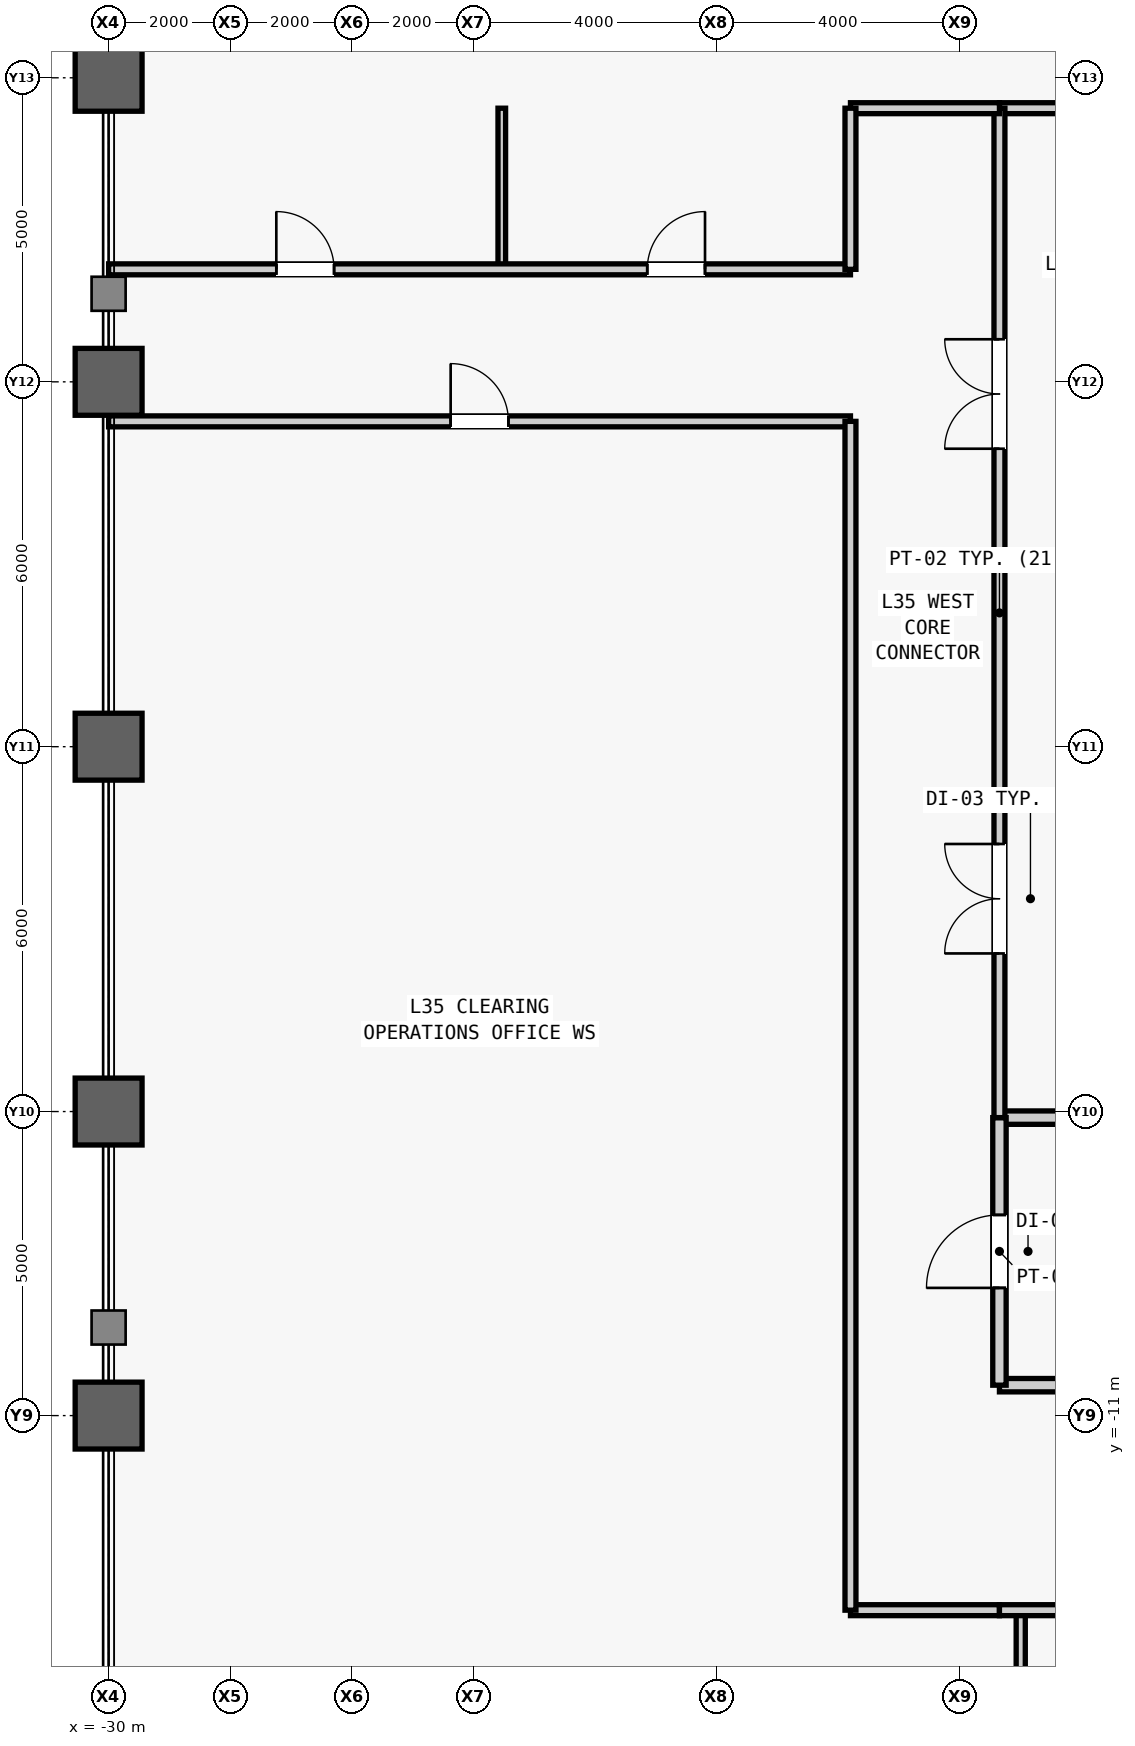
"""IFC4 building model, lengths in metres.
Left out: names, types, materials, properties, quantities, classifications, styles, units other than length and angle.
Written with IfcOpenShell. Run it as: python <this file> out.ifc"""

import sys

from ifc_helpers import new_model, si_unit, direction, frame, frame_2d, origin, origin_2d, place, context, subcontext, project, spatial, rectangle, hollow_rectangle, extrude, source, transform, mapped, element, fill, save


model = new_model("IFC4")
c1 = context("Model", 3, precision=1e-05, world=origin(), true_north=direction((0.0, 1.0)))
c2 = subcontext(c1, "Body", "Model", "MODEL_VIEW")
j1 = project(units=[si_unit("LENGTHUNIT", "METRE"), si_unit("PLANEANGLEUNIT", "RADIAN")], contexts=[c1])
p1 = place(None, origin())
s1 = spatial("IfcSite", under=j1, at=p1, CompositionType="ELEMENT")
p2 = place(p1, origin())
s2 = spatial("IfcBuilding", under=s1, at=p2, CompositionType="ELEMENT")
p3 = place(p2, frame((0.0, 0.0, 155.1)))
s3 = spatial("IfcBuildingStorey", under=s2, at=p3, CompositionType="ELEMENT", Elevation=155.1)
m1 = source(origin(), c2, "Body", "SweptSolid", [
    extrude(hollow_rectangle(XDim=1.1, YDim=1.1, WallThickness=0.06, at=origin_2d()), origin(), (0.0, 0.0, 1.0), 4.0),
])
for number, where, z_axis, x_axis in (
    (1, (-30.0, -11.0, 0.0), (0.0, 0.0, 1.0), (1.0, 0.0, 0.0)),
    (2, (-30.0, -6.0, 0.0), (0.0, 0.0, 1.0), (1.0, 0.0, 0.0)),
    (3, (-30.0, 0.0, 0.0), (0.0, 0.0, 1.0), (1.0, 0.0, 0.0)),
    (4, (-30.0, 6.0, 0.0), (0.0, 0.0, 1.0), (1.0, 0.0, 0.0)),
    (5, (-30.0, 11.0, 0.0), (0.0, 0.0, 1.0), (1.0, 0.0, 0.0)),
):
    element("IfcColumn", number, at=place(p3, frame(where, z_axis=z_axis, x_axis=x_axis)), inside=s3, PredefinedType="COLUMN", context=c2, shape_type="MappedRepresentation", body=[
        mapped(m1, transform((0.0, 0.0, 0.0), scale=1.0)),
    ])
m2 = source(origin(), c2, "Body", "SweptSolid", [
    extrude(rectangle(XDim=4.05, YDim=0.22, at=frame_2d((2.025, 0.0))), origin(), (0.0, 0.0, 1.0), 3.78),
])
p4 = place(p3, frame((-15.35, -10.5, 0.0), z_axis=(0.0, 0.0, 1.0), x_axis=(1.0, 0.0, 0.0)))
e6 = element("IfcWall", 6, at=p4, inside=s3, PredefinedType="PARTITIONING", context=c2, shape_type="MappedRepresentation", body=[
    mapped(m2, transform((0.0, 0.0, 0.0), scale=1.0)),
])
m3 = source(origin(), c2, "Body", "SweptSolid", [
    extrude(rectangle(XDim=4.05, YDim=0.22, at=frame_2d((2.025, 0.0))), origin(), (0.0, 0.0, 1.0), 3.007),
])
p5 = place(p3, frame((-15.35, -6.1, 0.0), z_axis=(0.0, 0.0, 1.0), x_axis=(1.0, 0.0, 0.0)))
e7 = element("IfcWall", 7, at=p5, inside=s3, PredefinedType="PARTITIONING", context=c2, shape_type="MappedRepresentation", body=[
    mapped(m3, transform((0.0, 0.0, 0.0), scale=1.0)),
])
m4 = source(origin(), c2, "Body", "SweptSolid", [
    extrude(rectangle(XDim=4.4, YDim=0.22, at=frame_2d((2.2, 0.0))), origin(), (0.0, 0.0, 1.0), 3.78),
])
p6 = place(p3, frame((-15.35, -10.5, 0.0), z_axis=(0.0, 0.0, 1.0), x_axis=(0.0, 1.0, 0.0)))
e8 = element("IfcWall", 8, at=p6, inside=s3, PredefinedType="PARTITIONING", context=c2, shape_type="MappedRepresentation", body=[
    mapped(m4, transform((0.0, 0.0, 0.0), scale=1.0)),
])
m5 = source(origin(), c2, "Body", "SweptSolid", [
    extrude(rectangle(XDim=1.2, YDim=2.2, at=frame_2d((0.6, 1.1))), frame((0.0, 0.12, 0.0), z_axis=(0.0, -1.0, 0.0), x_axis=(1.0, 0.0, 0.0)), (0.0, 0.0, 1.0), 0.24),
])
p7 = place(p6, frame((1.6, 0.0, 0.0)))
e9 = element("IfcOpeningElement", 9, at=p7, cuts=e8, PredefinedType="OPENING", context=c2, shape_type="MappedRepresentation", body=[
    mapped(m5, transform((0.0, 0.0, 0.0), scale=1.0)),
])
m6 = source(origin(), c2, "Body", "SweptSolid", [
    extrude(rectangle(XDim=4.05, YDim=0.18, at=frame_2d((2.025, 0.0))), origin(), (0.0, 0.0, 1.0), 3.78),
])
p8 = place(p3, frame((-15.35, 10.5, 0.0), z_axis=(0.0, 0.0, 1.0), x_axis=(1.0, 0.0, 0.0)))
e10 = element("IfcWall", 10, at=p8, inside=s3, PredefinedType="PARTITIONING", context=c2, shape_type="MappedRepresentation", body=[
    mapped(m6, transform((0.0, 0.0, 0.0), scale=1.0)),
])
m7 = source(origin(), c2, "Body", "SweptSolid", [
    extrude(rectangle(XDim=16.6, YDim=0.18, at=frame_2d((8.3, 0.0))), origin(), (0.0, 0.0, 1.0), 3.78),
])
p9 = place(p3, frame((-15.35, -6.1, 0.0), z_axis=(0.0, 0.0, 1.0), x_axis=(0.0, 1.0, 0.0)))
e11 = element("IfcWall", 11, at=p9, inside=s3, PredefinedType="PARTITIONING", context=c2, shape_type="MappedRepresentation", body=[
    mapped(m7, transform((0.0, 0.0, 0.0), scale=1.0)),
])
m8 = source(origin(), c2, "Body", "SweptSolid", [
    extrude(rectangle(XDim=1.8, YDim=2.25, at=frame_2d((0.9, 1.125))), frame((0.0, 0.1, 0.0), z_axis=(0.0, -1.0, 0.0), x_axis=(1.0, 0.0, 0.0)), (0.0, 0.0, 1.0), 0.2),
])
p10 = place(p9, frame((2.7, 0.0, 0.0)))
e12 = element("IfcOpeningElement", 12, at=p10, cuts=e11, PredefinedType="OPENING", context=c2, shape_type="MappedRepresentation", body=[
    mapped(m8, transform((0.0, 0.0, 0.0), scale=1.0)),
])
p11 = place(p9, frame((11.0, 0.0, 0.0)))
e13 = element("IfcOpeningElement", 13, at=p11, cuts=e11, PredefinedType="OPENING", context=c2, shape_type="MappedRepresentation", body=[
    mapped(m8, transform((0.0, 0.0, 0.0), scale=1.0)),
])
m9 = source(origin(), c2, "Body", "SweptSolid", [
    extrude(rectangle(XDim=2.45, YDim=0.18, at=frame_2d((1.225, 0.0))), origin(), (0.0, 0.0, 1.0), 3.78),
])
for number, where, z_axis, x_axis in (
    (14, (-17.8, 10.5, 0.0), (0.0, 0.0, 1.0), (1.0, 0.0, 0.0)),
    (15, (-17.8, -14.2, 0.0), (0.0, 0.0, 1.0), (1.0, 0.0, 0.0)),
):
    element("IfcWall", number, at=place(p3, frame(where, z_axis=z_axis, x_axis=x_axis)), inside=s3, PredefinedType="PARTITIONING", context=c2, shape_type="MappedRepresentation", body=[
        mapped(m9, transform((0.0, 0.0, 0.0), scale=1.0)),
    ])
m10 = source(origin(), c2, "Body", "SweptSolid", [
    extrude(rectangle(XDim=15.8, YDim=0.15, at=frame_2d((7.9, 0.0))), origin(), (0.0, 0.0, 1.0), 3.78),
])
p12 = place(p3, frame((-15.0, -30.0, 0.0), z_axis=(0.0, 0.0, 1.0), x_axis=(0.0, 1.0, 0.0)))
e16 = element("IfcWall", 16, at=p12, inside=s3, PredefinedType="PARTITIONING", context=c2, shape_type="MappedRepresentation", body=[
    mapped(m10, transform((0.0, 0.0, 0.0), scale=1.0)),
])
m11 = source(origin(), c2, "Body", "SweptSolid", [
    extrude(rectangle(XDim=0.95, YDim=2.15, at=frame_2d((0.475, 1.075))), frame((0.0, 0.085, 0.0), z_axis=(0.0, -1.0, 0.0), x_axis=(1.0, 0.0, 0.0)), (0.0, 0.0, 1.0), 0.17),
])
p13 = place(p12, frame((11.375, 0.0, 0.0)))
e17 = element("IfcOpeningElement", 17, at=p13, cuts=e16, PredefinedType="OPENING", context=c2, shape_type="MappedRepresentation", body=[
    mapped(m11, transform((0.0, 0.0, 0.0), scale=1.0)),
])
m12 = source(origin(), c2, "Body", "SweptSolid", [
    extrude(rectangle(XDim=27.35, YDim=0.18, at=frame_2d((13.675, 0.0))), origin(), (0.0, 0.0, 1.0), 3.78),
])
p14 = place(p3, frame((-15.35, -14.2, 0.0), z_axis=(0.0, 0.0, 1.0), x_axis=(1.0, 0.0, 0.0)))
e18 = element("IfcWall", 18, at=p14, inside=s3, PredefinedType="PARTITIONING", context=c2, shape_type="MappedRepresentation", body=[
    mapped(m12, transform((0.0, 0.0, 0.0), scale=1.0)),
])
m13 = source(origin(), c2, "Body", "SweptSolid", [
    extrude(rectangle(XDim=12.2, YDim=0.18, at=frame_2d((6.1, 0.0))), origin(), (0.0, 0.0, 1.0), 3.78),
])
p15 = place(p3, frame((-30.0, 5.35, 0.0), z_axis=(0.0, 0.0, 1.0), x_axis=(1.0, 0.0, 0.0)))
e19 = element("IfcWall", 19, at=p15, inside=s3, PredefinedType="PARTITIONING", context=c2, shape_type="MappedRepresentation", body=[
    mapped(m13, transform((0.0, 0.0, 0.0), scale=1.0)),
])
m14 = source(origin(), c2, "Body", "SweptSolid", [
    extrude(rectangle(XDim=0.95, YDim=2.15, at=frame_2d((0.475, 1.075))), frame((0.0, 0.1, 0.0), z_axis=(0.0, -1.0, 0.0), x_axis=(1.0, 0.0, 0.0)), (0.0, 0.0, 1.0), 0.2),
])
p16 = place(p15, frame((5.625, 0.0, 0.0)))
e20 = element("IfcOpeningElement", 20, at=p16, cuts=e19, PredefinedType="OPENING", context=c2, shape_type="MappedRepresentation", body=[
    mapped(m14, transform((0.0, 0.0, 0.0), scale=1.0)),
])
m15 = source(origin(), c2, "Body", "SweptSolid", [
    extrude(rectangle(XDim=19.55, YDim=0.18, at=frame_2d((9.775, 0.0))), origin(), (0.0, 0.0, 1.0), 3.78),
])
p17 = place(p3, frame((-17.8, -14.2, 0.0), z_axis=(0.0, 0.0, 1.0), x_axis=(0.0, 1.0, 0.0)))
e21 = element("IfcWall", 21, at=p17, inside=s3, PredefinedType="PARTITIONING", context=c2, shape_type="MappedRepresentation", body=[
    mapped(m15, transform((0.0, 0.0, 0.0), scale=1.0)),
])
m16 = source(origin(), c2, "Body", "SweptSolid", [
    extrude(rectangle(XDim=2.65, YDim=0.125, at=frame_2d((1.325, 0.0))), origin(), (0.0, 0.0, 1.0), 3.78),
])
p18 = place(p3, frame((-23.534, 7.85, 0.0), z_axis=(0.0, 0.0, 1.0), x_axis=(0.0, 1.0, 0.0)))
e22 = element("IfcWall", 22, at=p18, inside=s3, PredefinedType="PARTITIONING", context=c2, shape_type="MappedRepresentation", body=[
    mapped(m16, transform((0.0, 0.0, 0.0), scale=1.0)),
])
p19 = place(p3, frame((-30.0, 7.85, 0.0), z_axis=(0.0, 0.0, 1.0), x_axis=(1.0, 0.0, 0.0)))
e23 = element("IfcWall", 23, at=p19, inside=s3, PredefinedType="PARTITIONING", context=c2, shape_type="MappedRepresentation", body=[
    mapped(m13, transform((0.0, 0.0, 0.0), scale=1.0)),
])
p20 = place(p19, frame((2.758, 0.0, 0.0)))
e24 = element("IfcOpeningElement", 24, at=p20, cuts=e23, PredefinedType="OPENING", context=c2, shape_type="MappedRepresentation", body=[
    mapped(m14, transform((0.0, 0.0, 0.0), scale=1.0)),
])
p21 = place(p19, frame((8.858, 0.0, 0.0)))
e25 = element("IfcOpeningElement", 25, at=p21, cuts=e23, PredefinedType="OPENING", context=c2, shape_type="MappedRepresentation", body=[
    mapped(m14, transform((0.0, 0.0, 0.0), scale=1.0)),
])
m17 = source(origin(), c2, "Body", "SweptSolid", [
    extrude(rectangle(XDim=2.65, YDim=0.18, at=frame_2d((1.325, 0.0))), origin(), (0.0, 0.0, 1.0), 3.78),
])
p22 = place(p3, frame((-17.8, 7.85, 0.0), z_axis=(0.0, 0.0, 1.0), x_axis=(0.0, 1.0, 0.0)))
e26 = element("IfcWall", 26, at=p22, inside=s3, PredefinedType="PARTITIONING", context=c2, shape_type="MappedRepresentation", body=[
    mapped(m17, transform((0.0, 0.0, 0.0), scale=1.0)),
])
m18 = source(origin(), c2, "Body", "SweptSolid", [
    extrude(rectangle(XDim=1.2, YDim=2.2, at=frame_2d((0.6, 1.1))), frame((0.0, 0.025, 0.0), z_axis=(0.0, -1.0, 0.0), x_axis=(1.0, 0.0, 0.0)), (0.0, 0.0, 1.0), 0.05),
])
p23 = place(p7, origin())
e27 = element("IfcDoor", 27, at=p23, inside=s3, OperationType="SINGLE_SWING_LEFT", PredefinedType="DOOR", context=c2, shape_type="MappedRepresentation", body=[
    mapped(m18, transform((0.0, 0.0, 0.0), scale=1.0)),
])
fill(e9, e27)
m19 = source(origin(), c2, "Body", "SweptSolid", [
    extrude(rectangle(XDim=1.8, YDim=2.25, at=frame_2d((0.9, 1.125))), frame((0.0, 0.025, 0.0), z_axis=(0.0, -1.0, 0.0), x_axis=(1.0, 0.0, 0.0)), (0.0, 0.0, 1.0), 0.05),
])
p24 = place(p10, origin())
e28 = element("IfcDoor", 28, at=p24, inside=s3, OperationType="SINGLE_SWING_LEFT", PredefinedType="DOOR", context=c2, shape_type="MappedRepresentation", body=[
    mapped(m19, transform((0.0, 0.0, 0.0), scale=1.0)),
])
fill(e12, e28)
p25 = place(p11, origin())
e29 = element("IfcDoor", 29, at=p25, inside=s3, OperationType="SINGLE_SWING_RIGHT", PredefinedType="DOOR", context=c2, shape_type="MappedRepresentation", body=[
    mapped(m19, transform((0.0, 0.0, 0.0), scale=1.0)),
])
fill(e13, e29)
m20 = source(origin(), c2, "Body", "SweptSolid", [
    extrude(rectangle(XDim=0.95, YDim=2.15, at=frame_2d((0.475, 1.075))), frame((0.0, 0.025, 0.0), z_axis=(0.0, -1.0, 0.0), x_axis=(1.0, 0.0, 0.0)), (0.0, 0.0, 1.0), 0.05),
])
p26 = place(p16, origin())
e30 = element("IfcDoor", 30, at=p26, inside=s3, OperationType="SINGLE_SWING_LEFT", PredefinedType="DOOR", context=c2, shape_type="MappedRepresentation", body=[
    mapped(m20, transform((0.0, 0.0, 0.0), scale=1.0)),
])
fill(e20, e30)
p27 = place(p20, origin())
e31 = element("IfcDoor", 31, at=p27, inside=s3, OperationType="SINGLE_SWING_LEFT", PredefinedType="DOOR", context=c2, shape_type="MappedRepresentation", body=[
    mapped(m20, transform((0.0, 0.0, 0.0), scale=1.0)),
])
fill(e24, e31)
p28 = place(p21, origin())
e32 = element("IfcDoor", 32, at=p28, inside=s3, OperationType="SINGLE_SWING_RIGHT", PredefinedType="DOOR", context=c2, shape_type="MappedRepresentation", body=[
    mapped(m20, transform((0.0, 0.0, 0.0), scale=1.0)),
])
fill(e25, e32)
save(model, sys.argv[1])
